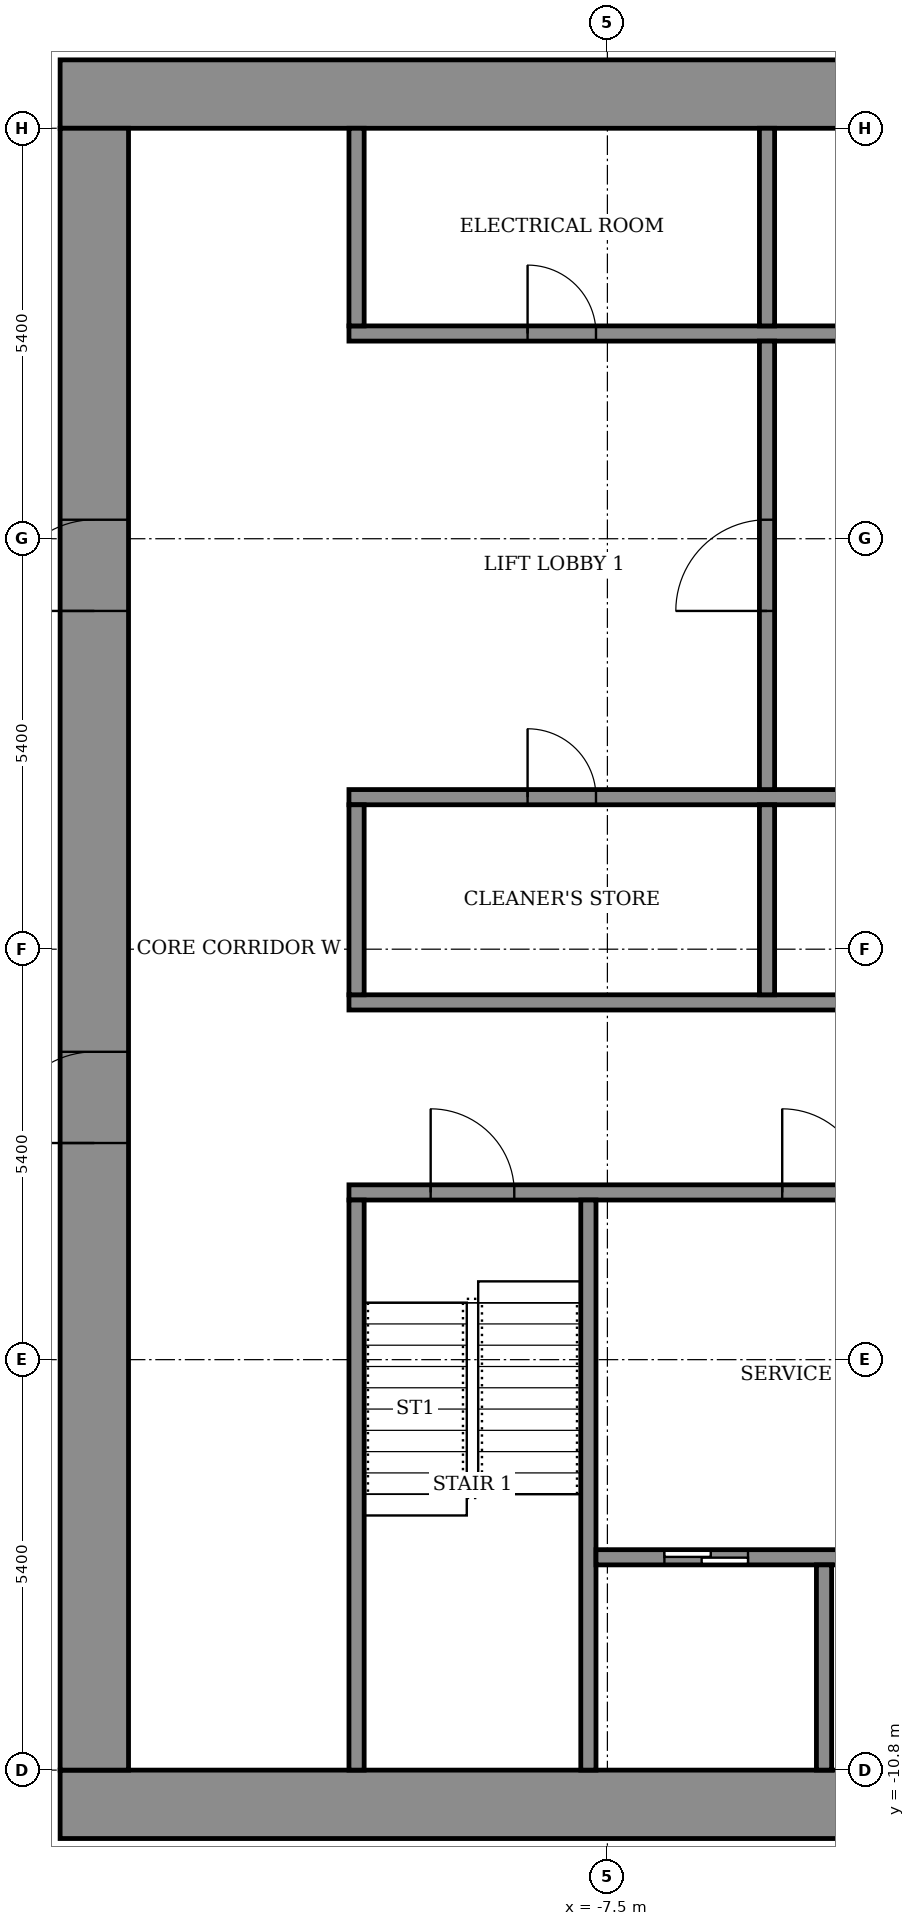
"""IFC4 building model, lengths in metres.
Left out: names, types, materials, properties, quantities, classifications, styles, units other than length and angle.
Written with IfcOpenShell. Run it as: python <this file> out.ifc"""

import sys

from ifc_helpers import new_model, si_unit, direction, frame, frame_2d, origin, place, context, subcontext, project, spatial, rectangle, extrude, element, fill, save


model = new_model("IFC4")
c1 = context("Model", 3, precision=1e-05, world=origin(), true_north=direction((0.0, 1.0)))
c2 = subcontext(c1, "Body", "Model", "MODEL_VIEW")
j1 = project(units=[si_unit("LENGTHUNIT", "METRE"), si_unit("PLANEANGLEUNIT", "RADIAN")], contexts=[c1])
p1 = place(None, origin())
s1 = spatial("IfcSite", under=j1, at=p1, CompositionType="ELEMENT")
p2 = place(p1, origin())
s2 = spatial("IfcBuilding", under=s1, at=p2, CompositionType="ELEMENT")
p3 = place(p2, frame((0.0, 0.0, 182.5)))
s3 = spatial("IfcBuildingStorey", under=s2, at=p3, CompositionType="ELEMENT", Elevation=182.5)
for number, where, z_axis, x_axis in (
    (1, (-14.7, -11.25, 0.0), (0.0, 0.0, 1.0), (1.0, 0.0, 0.0)),
    (2, (-14.7, 11.25, 0.0), (0.0, 0.0, 1.0), (1.0, 0.0, 0.0)),
):
    element("IfcWall", number, at=place(p3, frame(where, z_axis=z_axis, x_axis=x_axis)), inside=s3, PredefinedType="SHEAR", context=c2, shape_type="SweptSolid", body=[
        extrude(rectangle(XDim=29.4, YDim=0.9, at=frame_2d((14.7, 0.0))), origin(), (0.0, 0.0, 1.0), 3.6),
    ])
p4 = place(p3, frame((-14.25, -10.8, 0.0), z_axis=(0.0, 0.0, 1.0), x_axis=(0.0, 1.0, 0.0)))
e3 = element("IfcWall", 3, at=p4, inside=s3, PredefinedType="SHEAR", context=c2, shape_type="SweptSolid", body=[
    extrude(rectangle(XDim=21.6, YDim=0.9, at=frame_2d((10.8, 0.0))), origin(), (0.0, 0.0, 1.0), 3.6),
])
p5 = place(p4, frame((8.25, 0.0, 0.0)))
e4 = element("IfcOpeningElement", 4, at=p5, cuts=e3, PredefinedType="OPENING", context=c2, shape_type="SweptSolid", body=[
    extrude(rectangle(XDim=1.2, YDim=2.1, at=frame_2d((0.6, 1.05))), frame((0.0, 0.46, 0.0), z_axis=(0.0, -1.0, 0.0), x_axis=(1.0, 0.0, 0.0)), (0.0, 0.0, 1.0), 0.92),
])
p6 = place(p4, frame((15.25, 0.0, 0.0)))
e5 = element("IfcOpeningElement", 5, at=p6, cuts=e3, PredefinedType="OPENING", context=c2, shape_type="SweptSolid", body=[
    extrude(rectangle(XDim=1.2, YDim=2.1, at=frame_2d((0.6, 1.05))), frame((0.0, 0.46, 0.0), z_axis=(0.0, -1.0, 0.0), x_axis=(1.0, 0.0, 0.0)), (0.0, 0.0, 1.0), 0.92),
])
p7 = place(p3, frame((-10.9, -3.2, 0.0), z_axis=(0.0, 0.0, 1.0), x_axis=(1.0, 0.0, 0.0)))
e6 = element("IfcWall", 6, at=p7, inside=s3, PredefinedType="SHEAR", context=c2, shape_type="SweptSolid", body=[
    extrude(rectangle(XDim=21.8, YDim=0.2, at=frame_2d((10.9, 0.0))), origin(), (0.0, 0.0, 1.0), 3.05),
])
p8 = place(p7, frame((1.075, 0.0, 0.0)))
e7 = element("IfcOpeningElement", 7, at=p8, cuts=e6, PredefinedType="OPENING", context=c2, shape_type="SweptSolid", body=[
    extrude(rectangle(XDim=1.1, YDim=2.1, at=frame_2d((0.55, 1.05))), frame((0.0, 0.11, 0.0), z_axis=(0.0, -1.0, 0.0), x_axis=(1.0, 0.0, 0.0)), (0.0, 0.0, 1.0), 0.22),
])
p9 = place(p7, frame((10.325, 0.0, 0.0)))
e8 = element("IfcOpeningElement", 8, at=p9, cuts=e6, PredefinedType="OPENING", context=c2, shape_type="SweptSolid", body=[
    extrude(rectangle(XDim=1.1, YDim=2.1, at=frame_2d((0.55, 1.05))), frame((0.0, 0.11, 0.0), z_axis=(0.0, -1.0, 0.0), x_axis=(1.0, 0.0, 0.0)), (0.0, 0.0, 1.0), 0.22),
])
p10 = place(p7, frame((19.625, 0.0, 0.0)))
e9 = element("IfcOpeningElement", 9, at=p10, cuts=e6, PredefinedType="OPENING", context=c2, shape_type="SweptSolid", body=[
    extrude(rectangle(XDim=1.1, YDim=2.1, at=frame_2d((0.55, 1.05))), frame((0.0, 0.11, 0.0), z_axis=(0.0, -1.0, 0.0), x_axis=(1.0, 0.0, 0.0)), (0.0, 0.0, 1.0), 0.22),
])
p11 = place(p7, frame((5.7, 0.0, 0.0)))
e10 = element("IfcOpeningElement", 10, at=p11, cuts=e6, PredefinedType="OPENING", context=c2, shape_type="SweptSolid", body=[
    extrude(rectangle(XDim=1.1, YDim=2.1, at=frame_2d((0.55, 1.05))), frame((0.0, 0.11, 0.0), z_axis=(0.0, -1.0, 0.0), x_axis=(1.0, 0.0, 0.0)), (0.0, 0.0, 1.0), 0.22),
])
p12 = place(p7, frame((14.975, 0.0, 0.0)))
e11 = element("IfcOpeningElement", 11, at=p12, cuts=e6, PredefinedType="OPENING", context=c2, shape_type="SweptSolid", body=[
    extrude(rectangle(XDim=1.1, YDim=2.1, at=frame_2d((0.55, 1.05))), frame((0.0, 0.11, 0.0), z_axis=(0.0, -1.0, 0.0), x_axis=(1.0, 0.0, 0.0)), (0.0, 0.0, 1.0), 0.22),
])
p13 = place(p3, frame((-10.9, -0.7, 0.0), z_axis=(0.0, 0.0, 1.0), x_axis=(1.0, 0.0, 0.0)))
e12 = element("IfcWall", 12, at=p13, inside=s3, PredefinedType="SHEAR", context=c2, shape_type="SweptSolid", body=[
    extrude(rectangle(XDim=21.8, YDim=0.2, at=frame_2d((10.9, 0.0))), origin(), (0.0, 0.0, 1.0), 3.05),
])
p14 = place(p3, frame((-10.9, 2.0, 0.0), z_axis=(0.0, 0.0, 1.0), x_axis=(1.0, 0.0, 0.0)))
e13 = element("IfcWall", 13, at=p14, inside=s3, PredefinedType="SHEAR", context=c2, shape_type="SweptSolid", body=[
    extrude(rectangle(XDim=21.8, YDim=0.2, at=frame_2d((10.9, 0.0))), origin(), (0.0, 0.0, 1.0), 3.05),
])
p15 = place(p14, frame((14.4, 0.0, 0.0)))
e14 = element("IfcOpeningElement", 14, at=p15, cuts=e13, PredefinedType="OPENING", context=c2, shape_type="SweptSolid", body=[
    extrude(rectangle(XDim=1.1, YDim=2.1, at=frame_2d((0.55, 1.05))), frame((0.0, 0.11, 0.0), z_axis=(0.0, -1.0, 0.0), x_axis=(1.0, 0.0, 0.0)), (0.0, 0.0, 1.0), 0.22),
])
p16 = place(p14, frame((17.1, 0.0, 0.0)))
e15 = element("IfcOpeningElement", 15, at=p16, cuts=e13, PredefinedType="OPENING", context=c2, shape_type="SweptSolid", body=[
    extrude(rectangle(XDim=1.1, YDim=2.1, at=frame_2d((0.55, 1.05))), frame((0.0, 0.11, 0.0), z_axis=(0.0, -1.0, 0.0), x_axis=(1.0, 0.0, 0.0)), (0.0, 0.0, 1.0), 0.22),
])
p17 = place(p14, frame((19.8, 0.0, 0.0)))
e16 = element("IfcOpeningElement", 16, at=p17, cuts=e13, PredefinedType="OPENING", context=c2, shape_type="SweptSolid", body=[
    extrude(rectangle(XDim=1.1, YDim=2.1, at=frame_2d((0.55, 1.05))), frame((0.0, 0.11, 0.0), z_axis=(0.0, -1.0, 0.0), x_axis=(1.0, 0.0, 0.0)), (0.0, 0.0, 1.0), 0.22),
])
p18 = place(p14, frame((2.35, 0.0, 0.0)))
e17 = element("IfcOpeningElement", 17, at=p18, cuts=e13, PredefinedType="OPENING", context=c2, shape_type="SweptSolid", body=[
    extrude(rectangle(XDim=0.9, YDim=2.1, at=frame_2d((0.45, 1.05))), frame((0.0, 0.11, 0.0), z_axis=(0.0, -1.0, 0.0), x_axis=(1.0, 0.0, 0.0)), (0.0, 0.0, 1.0), 0.22),
])
p19 = place(p14, frame((9.1, 0.0, 0.0)))
e18 = element("IfcOpeningElement", 18, at=p19, cuts=e13, PredefinedType="OPENING", context=c2, shape_type="SweptSolid", body=[
    extrude(rectangle(XDim=0.9, YDim=2.1, at=frame_2d((0.45, 1.05))), frame((0.0, 0.11, 0.0), z_axis=(0.0, -1.0, 0.0), x_axis=(1.0, 0.0, 0.0)), (0.0, 0.0, 1.0), 0.22),
])
p20 = place(p3, frame((-10.9, 8.1, 0.0), z_axis=(0.0, 0.0, 1.0), x_axis=(1.0, 0.0, 0.0)))
e19 = element("IfcWall", 19, at=p20, inside=s3, PredefinedType="SHEAR", context=c2, shape_type="SweptSolid", body=[
    extrude(rectangle(XDim=21.8, YDim=0.2, at=frame_2d((10.9, 0.0))), origin(), (0.0, 0.0, 1.0), 3.05),
])
p21 = place(p20, frame((14.4, 0.0, 0.0)))
e20 = element("IfcOpeningElement", 20, at=p21, cuts=e19, PredefinedType="OPENING", context=c2, shape_type="SweptSolid", body=[
    extrude(rectangle(XDim=1.1, YDim=2.1, at=frame_2d((0.55, 1.05))), frame((0.0, 0.11, 0.0), z_axis=(0.0, -1.0, 0.0), x_axis=(1.0, 0.0, 0.0)), (0.0, 0.0, 1.0), 0.22),
])
p22 = place(p20, frame((17.1, 0.0, 0.0)))
e21 = element("IfcOpeningElement", 21, at=p22, cuts=e19, PredefinedType="OPENING", context=c2, shape_type="SweptSolid", body=[
    extrude(rectangle(XDim=1.1, YDim=2.1, at=frame_2d((0.55, 1.05))), frame((0.0, 0.11, 0.0), z_axis=(0.0, -1.0, 0.0), x_axis=(1.0, 0.0, 0.0)), (0.0, 0.0, 1.0), 0.22),
])
p23 = place(p20, frame((19.8, 0.0, 0.0)))
e22 = element("IfcOpeningElement", 22, at=p23, cuts=e19, PredefinedType="OPENING", context=c2, shape_type="SweptSolid", body=[
    extrude(rectangle(XDim=1.1, YDim=2.1, at=frame_2d((0.55, 1.05))), frame((0.0, 0.11, 0.0), z_axis=(0.0, -1.0, 0.0), x_axis=(1.0, 0.0, 0.0)), (0.0, 0.0, 1.0), 0.22),
])
p24 = place(p20, frame((2.35, 0.0, 0.0)))
e23 = element("IfcOpeningElement", 23, at=p24, cuts=e19, PredefinedType="OPENING", context=c2, shape_type="SweptSolid", body=[
    extrude(rectangle(XDim=0.9, YDim=2.1, at=frame_2d((0.45, 1.05))), frame((0.0, 0.11, 0.0), z_axis=(0.0, -1.0, 0.0), x_axis=(1.0, 0.0, 0.0)), (0.0, 0.0, 1.0), 0.22),
])
p25 = place(p20, frame((9.1, 0.0, 0.0)))
e24 = element("IfcOpeningElement", 24, at=p25, cuts=e19, PredefinedType="OPENING", context=c2, shape_type="SweptSolid", body=[
    extrude(rectangle(XDim=0.9, YDim=2.1, at=frame_2d((0.45, 1.05))), frame((0.0, 0.11, 0.0), z_axis=(0.0, -1.0, 0.0), x_axis=(1.0, 0.0, 0.0)), (0.0, 0.0, 1.0), 0.22),
])
for number, where, z_axis, x_axis in (
    (25, (-10.8, -10.8, 0.0), (0.0, 0.0, 1.0), (0.0, 1.0, 0.0)),
    (26, (-7.75, -10.8, 0.0), (0.0, 0.0, 1.0), (0.0, 1.0, 0.0)),
):
    element("IfcWall", number, at=place(p3, frame(where, z_axis=z_axis, x_axis=x_axis)), inside=s3, PredefinedType="SHEAR", context=c2, shape_type="SweptSolid", body=[
        extrude(rectangle(XDim=7.5, YDim=0.2, at=frame_2d((3.75, 0.0))), origin(), (0.0, 0.0, 1.0), 3.05),
    ])
p26 = place(p3, frame((-7.65, -8.0, 0.0), z_axis=(0.0, 0.0, 1.0), x_axis=(1.0, 0.0, 0.0)))
e27 = element("IfcWall", 27, at=p26, inside=s3, PredefinedType="SHEAR", context=c2, shape_type="SweptSolid", body=[
    extrude(rectangle(XDim=6.0, YDim=0.2, at=frame_2d((3.0, 0.0))), origin(), (0.0, 0.0, 1.0), 3.05),
])
p27 = place(p26, frame((0.9, 0.0, 0.0)))
e28 = element("IfcOpeningElement", 28, at=p27, cuts=e27, PredefinedType="OPENING", context=c2, shape_type="SweptSolid", body=[
    extrude(rectangle(XDim=1.1, YDim=2.1, at=frame_2d((0.55, 1.05))), frame((0.0, 0.11, 0.0), z_axis=(0.0, -1.0, 0.0), x_axis=(1.0, 0.0, 0.0)), (0.0, 0.0, 1.0), 0.22),
])
p28 = place(p26, frame((4.0, 0.0, 0.0)))
e29 = element("IfcOpeningElement", 29, at=p28, cuts=e27, PredefinedType="OPENING", context=c2, shape_type="SweptSolid", body=[
    extrude(rectangle(XDim=1.1, YDim=2.1, at=frame_2d((0.55, 1.05))), frame((0.0, 0.11, 0.0), z_axis=(0.0, -1.0, 0.0), x_axis=(1.0, 0.0, 0.0)), (0.0, 0.0, 1.0), 0.22),
])
p29 = place(p3, frame((-4.65, -10.8, 0.0), z_axis=(0.0, 0.0, 1.0), x_axis=(0.0, 1.0, 0.0)))
e30 = element("IfcWall", 30, at=p29, inside=s3, PredefinedType="SHEAR", context=c2, shape_type="SweptSolid", body=[
    extrude(rectangle(XDim=2.7, YDim=0.2, at=frame_2d((1.35, 0.0))), origin(), (0.0, 0.0, 1.0), 3.05),
])
for number, where, z_axis, x_axis in (
    (31, (-10.8, -0.6, 0.0), (0.0, 0.0, 1.0), (0.0, 1.0, 0.0)),
    (32, (-5.4, -0.6, 0.0), (0.0, 0.0, 1.0), (0.0, 1.0, 0.0)),
):
    element("IfcWall", number, at=place(p3, frame(where, z_axis=z_axis, x_axis=x_axis)), inside=s3, PredefinedType="STANDARD", context=c2, shape_type="SweptSolid", body=[
        extrude(rectangle(XDim=2.5, YDim=0.2, at=frame_2d((1.25, 0.0))), origin(), (0.0, 0.0, 1.0), 3.05),
    ])
for number, where, z_axis, x_axis in (
    (33, (-10.8, 8.2, 0.0), (0.0, 0.0, 1.0), (0.0, 1.0, 0.0)),
    (34, (-5.4, 8.2, 0.0), (0.0, 0.0, 1.0), (0.0, 1.0, 0.0)),
):
    element("IfcWall", number, at=place(p3, frame(where, z_axis=z_axis, x_axis=x_axis)), inside=s3, PredefinedType="STANDARD", context=c2, shape_type="SweptSolid", body=[
        extrude(rectangle(XDim=2.6, YDim=0.2, at=frame_2d((1.3, 0.0))), origin(), (0.0, 0.0, 1.0), 3.05),
    ])
p30 = place(p3, frame((-5.4, 2.1, 0.0), z_axis=(0.0, 0.0, 1.0), x_axis=(0.0, 1.0, 0.0)))
e35 = element("IfcWall", 35, at=p30, inside=s3, PredefinedType="STANDARD", context=c2, shape_type="SweptSolid", body=[
    extrude(rectangle(XDim=5.9, YDim=0.2, at=frame_2d((2.95, 0.0))), origin(), (0.0, 0.0, 1.0), 3.05),
])
p31 = place(p30, frame((2.35, 0.0, 0.0)))
e36 = element("IfcOpeningElement", 36, at=p31, cuts=e35, PredefinedType="OPENING", context=c2, shape_type="SweptSolid", body=[
    extrude(rectangle(XDim=1.2, YDim=2.1, at=frame_2d((0.6, 1.05))), frame((0.0, 0.11, 0.0), z_axis=(0.0, -1.0, 0.0), x_axis=(1.0, 0.0, 0.0)), (0.0, 0.0, 1.0), 0.22),
])
p32 = place(p5, origin())
e37 = element("IfcDoor", 37, at=p32, inside=s3, OperationType="DOUBLE_DOOR_SINGLE_SWING", PredefinedType="DOOR", context=c2, shape_type="SweptSolid", body=[
    extrude(rectangle(XDim=1.2, YDim=2.1, at=frame_2d((0.6, 1.05))), frame((0.0, 0.025, 0.0), z_axis=(0.0, -1.0, 0.0), x_axis=(1.0, 0.0, 0.0)), (0.0, 0.0, 1.0), 0.05),
])
fill(e4, e37)
p33 = place(p6, origin())
e38 = element("IfcDoor", 38, at=p33, inside=s3, OperationType="DOUBLE_DOOR_SINGLE_SWING", PredefinedType="DOOR", context=c2, shape_type="SweptSolid", body=[
    extrude(rectangle(XDim=1.2, YDim=2.1, at=frame_2d((0.6, 1.05))), frame((0.0, 0.025, 0.0), z_axis=(0.0, -1.0, 0.0), x_axis=(1.0, 0.0, 0.0)), (0.0, 0.0, 1.0), 0.05),
])
fill(e5, e38)
p34 = place(p18, origin())
e39 = element("IfcDoor", 39, at=p34, inside=s3, OperationType="SINGLE_SWING_RIGHT", PredefinedType="DOOR", context=c2, shape_type="SweptSolid", body=[
    extrude(rectangle(XDim=0.9, YDim=2.1, at=frame_2d((0.45, 1.05))), frame((0.0, 0.025, 0.0), z_axis=(0.0, -1.0, 0.0), x_axis=(1.0, 0.0, 0.0)), (0.0, 0.0, 1.0), 0.05),
])
fill(e17, e39)
p35 = place(p24, origin())
e40 = element("IfcDoor", 40, at=p35, inside=s3, OperationType="SINGLE_SWING_LEFT", PredefinedType="DOOR", context=c2, shape_type="SweptSolid", body=[
    extrude(rectangle(XDim=0.9, YDim=2.1, at=frame_2d((0.45, 1.05))), frame((0.0, 0.025, 0.0), z_axis=(0.0, -1.0, 0.0), x_axis=(1.0, 0.0, 0.0)), (0.0, 0.0, 1.0), 0.05),
])
fill(e23, e40)
p36 = place(p27, origin())
e41 = element("IfcDoor", 41, at=p36, inside=s3, OperationType="SLIDING_TO_LEFT", PredefinedType="DOOR", context=c2, shape_type="SweptSolid", body=[
    extrude(rectangle(XDim=1.1, YDim=2.1, at=frame_2d((0.55, 1.05))), frame((0.0, 0.025, 0.0), z_axis=(0.0, -1.0, 0.0), x_axis=(1.0, 0.0, 0.0)), (0.0, 0.0, 1.0), 0.05),
])
fill(e28, e41)
p37 = place(p8, origin())
e42 = element("IfcDoor", 42, at=p37, inside=s3, OperationType="SINGLE_SWING_RIGHT", PredefinedType="DOOR", context=c2, shape_type="SweptSolid", body=[
    extrude(rectangle(XDim=1.1, YDim=2.1, at=frame_2d((0.55, 1.05))), frame((0.0, 0.025, 0.0), z_axis=(0.0, -1.0, 0.0), x_axis=(1.0, 0.0, 0.0)), (0.0, 0.0, 1.0), 0.05),
])
fill(e7, e42)
p38 = place(p11, origin())
e43 = element("IfcDoor", 43, at=p38, inside=s3, OperationType="SINGLE_SWING_LEFT", PredefinedType="DOOR", context=c2, shape_type="SweptSolid", body=[
    extrude(rectangle(XDim=1.1, YDim=2.1, at=frame_2d((0.55, 1.05))), frame((0.0, 0.025, 0.0), z_axis=(0.0, -1.0, 0.0), x_axis=(1.0, 0.0, 0.0)), (0.0, 0.0, 1.0), 0.05),
])
fill(e10, e43)
p39 = place(p31, origin())
e44 = element("IfcDoor", 44, at=p39, inside=s3, OperationType="SINGLE_SWING_LEFT", PredefinedType="DOOR", context=c2, shape_type="SweptSolid", body=[
    extrude(rectangle(XDim=1.2, YDim=2.1, at=frame_2d((0.6, 1.05))), frame((0.0, 0.025, 0.0), z_axis=(0.0, -1.0, 0.0), x_axis=(1.0, 0.0, 0.0)), (0.0, 0.0, 1.0), 0.05),
])
fill(e36, e44)
save(model, sys.argv[1])
